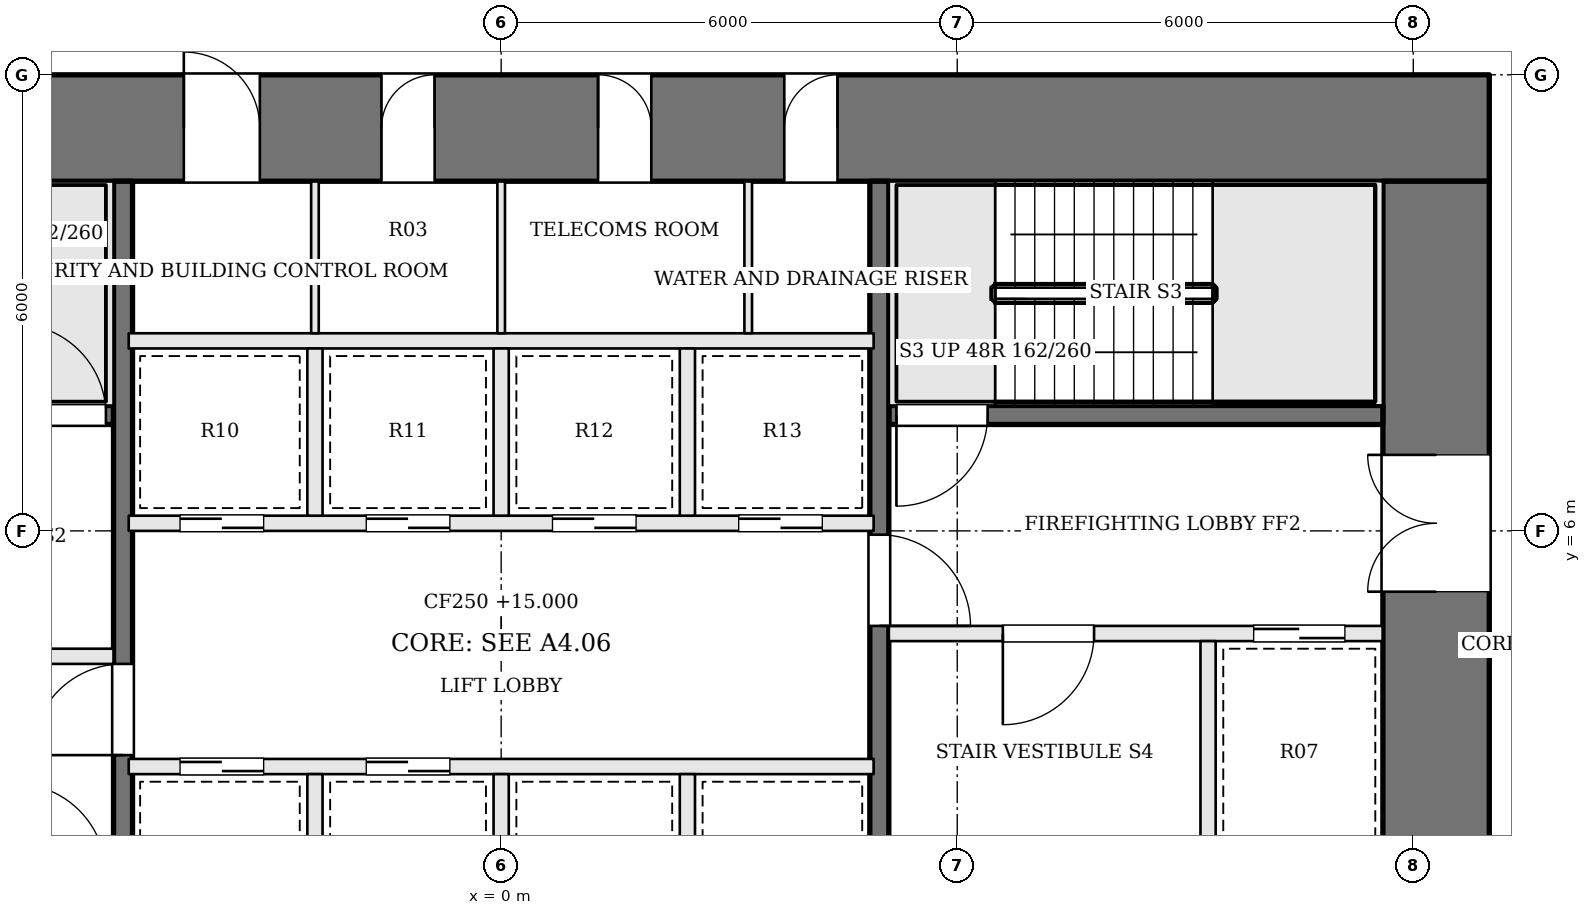
"""IFC4 building model, lengths in metres.
Left out: names, types, materials, properties, quantities, classifications, styles, units other than length and angle.
Written with IfcOpenShell. Run it as: python <this file> out.ifc"""

import sys

from ifc_helpers import new_model, si_unit, direction, frame, frame_2d, origin, place, context, subcontext, project, spatial, rectangle, extrude, element, fill, save


model = new_model("IFC4")
c1 = context("Model", 3, precision=1e-05, world=origin(), true_north=direction((0.0, 1.0)))
c2 = subcontext(c1, "Body", "Model", "MODEL_VIEW")
j1 = project(units=[si_unit("LENGTHUNIT", "METRE"), si_unit("PLANEANGLEUNIT", "RADIAN")], contexts=[c1])
p1 = place(None, origin())
s1 = spatial("IfcSite", under=j1, at=p1, CompositionType="ELEMENT")
p2 = place(p1, origin())
s2 = spatial("IfcBuilding", under=s1, at=p2, CompositionType="ELEMENT")
p3 = place(p2, frame((0.0, 0.0, 15.0)))
s3 = spatial("IfcBuildingStorey", under=s2, at=p3, CompositionType="ELEMENT", Elevation=15.0)
p4 = place(p3, frame((-13.0, 11.3, 0.0), z_axis=(0.0, 0.0, 1.0), x_axis=(1.0, 0.0, 0.0)))
e1 = element("IfcWall", 1, at=p4, inside=s3, PredefinedType="SHEAR", context=c2, shape_type="SweptSolid", body=[
    extrude(rectangle(XDim=26.0, YDim=1.4, at=frame_2d((13.0, 0.0))), origin(), (0.0, 0.0, 1.0), 7.8),
])
p5 = place(p4, frame((8.825, 0.0, 0.0)))
e2 = element("IfcOpeningElement", 2, at=p5, cuts=e1, PredefinedType="OPENING", context=c2, shape_type="SweptSolid", body=[
    extrude(rectangle(XDim=1.0, YDim=2.1, at=frame_2d((0.5, 1.05))), frame((0.0, 0.71, 0.0), z_axis=(0.0, -1.0, 0.0), x_axis=(1.0, 0.0, 0.0)), (0.0, 0.0, 1.0), 1.42),
])
p6 = place(p4, frame((11.425, 0.0, 0.0)))
e3 = element("IfcOpeningElement", 3, at=p6, cuts=e1, PredefinedType="OPENING", context=c2, shape_type="SweptSolid", body=[
    extrude(rectangle(XDim=0.7, YDim=2.1, at=frame_2d((0.35, 1.05))), frame((0.0, 0.71, 0.0), z_axis=(0.0, -1.0, 0.0), x_axis=(1.0, 0.0, 0.0)), (0.0, 0.0, 1.0), 1.42),
])
p7 = place(p4, frame((14.275, 0.0, 0.0)))
e4 = element("IfcOpeningElement", 4, at=p7, cuts=e1, PredefinedType="OPENING", context=c2, shape_type="SweptSolid", body=[
    extrude(rectangle(XDim=0.7, YDim=2.1, at=frame_2d((0.35, 1.05))), frame((0.0, 0.71, 0.0), z_axis=(0.0, -1.0, 0.0), x_axis=(1.0, 0.0, 0.0)), (0.0, 0.0, 1.0), 1.42),
])
p8 = place(p4, frame((16.725, 0.0, 0.0)))
e5 = element("IfcOpeningElement", 5, at=p8, cuts=e1, PredefinedType="OPENING", context=c2, shape_type="SweptSolid", body=[
    extrude(rectangle(XDim=0.7, YDim=2.1, at=frame_2d((0.35, 1.05))), frame((0.0, 0.71, 0.0), z_axis=(0.0, -1.0, 0.0), x_axis=(1.0, 0.0, 0.0)), (0.0, 0.0, 1.0), 1.42),
])
p9 = place(p3, frame((12.3, -1.6, 0.0), z_axis=(0.0, 0.0, 1.0), x_axis=(0.0, 1.0, 0.0)))
e6 = element("IfcWall", 6, at=p9, inside=s3, PredefinedType="SHEAR", context=c2, shape_type="SweptSolid", body=[
    extrude(rectangle(XDim=12.2, YDim=1.4, at=frame_2d((6.1, 0.0))), origin(), (0.0, 0.0, 1.0), 7.8),
])
p10 = place(p9, frame((6.8, 0.0, 0.0)))
e7 = element("IfcOpeningElement", 7, at=p10, cuts=e6, PredefinedType="OPENING", context=c2, shape_type="SweptSolid", body=[
    extrude(rectangle(XDim=1.8, YDim=2.1, at=frame_2d((0.9, 1.05))), frame((0.0, 0.71, 0.0), z_axis=(0.0, -1.0, 0.0), x_axis=(1.0, 0.0, 0.0)), (0.0, 0.0, 1.0), 1.42),
])
p11 = place(p3, frame((11.6, 7.525, 0.0), z_axis=(0.0, 0.0, 1.0), x_axis=(-1.0, 0.0, 0.0)))
e8 = element("IfcWall", 8, at=p11, inside=s3, PredefinedType="SOLIDWALL", context=c2, shape_type="SweptSolid", body=[
    extrude(rectangle(XDim=6.5, YDim=0.25, at=frame_2d((3.25, 0.0))), origin(), (0.0, 0.0, 1.0), 7.55),
])
p12 = place(p11, frame((5.2, 0.0, 0.0)))
e9 = element("IfcOpeningElement", 9, at=p12, cuts=e8, PredefinedType="OPENING", context=c2, shape_type="SweptSolid", body=[
    extrude(rectangle(XDim=1.2, YDim=2.1, at=frame_2d((0.6, 1.05))), frame((0.0, 0.135, 0.0), z_axis=(0.0, -1.0, 0.0), x_axis=(1.0, 0.0, 0.0)), (0.0, 0.0, 1.0), 0.27),
])
p13 = place(p3, frame((-11.6, 4.35, 0.0), z_axis=(0.0, 0.0, 1.0), x_axis=(1.0, 0.0, 0.0)))
e10 = element("IfcWall", 10, at=p13, inside=s3, PredefinedType="SOLIDWALL", context=c2, shape_type="SweptSolid", body=[
    extrude(rectangle(XDim=6.5, YDim=0.2, at=frame_2d((3.25, 0.0))), origin(), (0.0, 0.0, 1.0), 7.55),
])
p14 = place(p13, frame((3.8, 0.0, 0.0)))
e11 = element("IfcOpeningElement", 11, at=p14, cuts=e10, PredefinedType="OPENING", context=c2, shape_type="SweptSolid", body=[
    extrude(rectangle(XDim=1.2, YDim=2.1, at=frame_2d((0.6, 1.05))), frame((0.0, 0.11, 0.0), z_axis=(0.0, -1.0, 0.0), x_axis=(1.0, 0.0, 0.0)), (0.0, 0.0, 1.0), 0.22),
])
p15 = place(p13, frame((0.5, 0.0, 0.0)))
e12 = element("IfcOpeningElement", 12, at=p15, cuts=e10, PredefinedType="OPENING", context=c2, shape_type="SweptSolid", body=[
    extrude(rectangle(XDim=1.2, YDim=2.1, at=frame_2d((0.6, 1.05))), frame((0.0, 0.11, 0.0), z_axis=(0.0, -1.0, 0.0), x_axis=(1.0, 0.0, 0.0)), (0.0, 0.0, 1.0), 0.22),
])
p16 = place(p3, frame((11.6, 4.65, 0.0), z_axis=(0.0, 0.0, 1.0), x_axis=(-1.0, 0.0, 0.0)))
e13 = element("IfcWall", 13, at=p16, inside=s3, PredefinedType="SOLIDWALL", context=c2, shape_type="SweptSolid", body=[
    extrude(rectangle(XDim=6.5, YDim=0.2, at=frame_2d((3.25, 0.0))), origin(), (0.0, 0.0, 1.0), 7.55),
])
p17 = place(p16, frame((3.8, 0.0, 0.0)))
e14 = element("IfcOpeningElement", 14, at=p17, cuts=e13, PredefinedType="OPENING", context=c2, shape_type="SweptSolid", body=[
    extrude(rectangle(XDim=1.2, YDim=2.1, at=frame_2d((0.6, 1.05))), frame((0.0, 0.11, 0.0), z_axis=(0.0, -1.0, 0.0), x_axis=(1.0, 0.0, 0.0)), (0.0, 0.0, 1.0), 0.22),
])
p18 = place(p16, frame((0.5, 0.0, 0.0)))
e15 = element("IfcOpeningElement", 15, at=p18, cuts=e13, PredefinedType="OPENING", context=c2, shape_type="SweptSolid", body=[
    extrude(rectangle(XDim=1.2, YDim=2.1, at=frame_2d((0.6, 1.05))), frame((0.0, 0.11, 0.0), z_axis=(0.0, -1.0, 0.0), x_axis=(1.0, 0.0, 0.0)), (0.0, 0.0, 1.0), 0.22),
])
p19 = place(p3, frame((-11.6, 7.525, 0.0), z_axis=(0.0, 0.0, 1.0), x_axis=(1.0, 0.0, 0.0)))
e16 = element("IfcWall", 16, at=p19, inside=s3, PredefinedType="SOLIDWALL", context=c2, shape_type="SweptSolid", body=[
    extrude(rectangle(XDim=6.5, YDim=0.25, at=frame_2d((3.25, 0.0))), origin(), (0.0, 0.0, 1.0), 7.55),
])
p20 = place(p19, frame((5.2, 0.0, 0.0)))
e17 = element("IfcOpeningElement", 17, at=p20, cuts=e16, PredefinedType="OPENING", context=c2, shape_type="SweptSolid", body=[
    extrude(rectangle(XDim=1.2, YDim=2.1, at=frame_2d((0.6, 1.05))), frame((0.0, 0.135, 0.0), z_axis=(0.0, -1.0, 0.0), x_axis=(1.0, 0.0, 0.0)), (0.0, 0.0, 1.0), 0.27),
])
p21 = place(p3, frame((9.3, 4.55, 0.0), z_axis=(0.0, 0.0, 1.0), x_axis=(0.0, -1.0, 0.0)))
e18 = element("IfcWall", 18, at=p21, inside=s3, PredefinedType="SOLIDWALL", context=c2, shape_type="SweptSolid", body=[
    extrude(rectangle(XDim=3.0, YDim=0.2, at=frame_2d((1.5, 0.0))), origin(), (0.0, 0.0, 1.0), 7.55),
])
p22 = place(p3, frame((-4.975, -1.6, 0.0), z_axis=(0.0, 0.0, 1.0), x_axis=(0.0, 1.0, 0.0)))
e19 = element("IfcWall", 19, at=p22, inside=s3, PredefinedType="SOLIDWALL", context=c2, shape_type="SweptSolid", body=[
    extrude(rectangle(XDim=12.2, YDim=0.25, at=frame_2d((6.1, 0.0))), origin(), (0.0, 0.0, 1.0), 7.55),
])
p23 = place(p22, frame((4.65, 0.0, 0.0)))
e20 = element("IfcOpeningElement", 20, at=p23, cuts=e19, PredefinedType="OPENING", context=c2, shape_type="SweptSolid", body=[
    extrude(rectangle(XDim=1.2, YDim=2.1, at=frame_2d((0.6, 1.05))), frame((0.0, 0.135, 0.0), z_axis=(0.0, -1.0, 0.0), x_axis=(1.0, 0.0, 0.0)), (0.0, 0.0, 1.0), 0.27),
])
p24 = place(p3, frame((4.975, 10.6, 0.0), z_axis=(0.0, 0.0, 1.0), x_axis=(0.0, -1.0, 0.0)))
e21 = element("IfcWall", 21, at=p24, inside=s3, PredefinedType="SOLIDWALL", context=c2, shape_type="SweptSolid", body=[
    extrude(rectangle(XDim=12.2, YDim=0.25, at=frame_2d((6.1, 0.0))), origin(), (0.0, 0.0, 1.0), 7.55),
])
p25 = place(p24, frame((4.65, 0.0, 0.0)))
e22 = element("IfcOpeningElement", 22, at=p25, cuts=e21, PredefinedType="OPENING", context=c2, shape_type="SweptSolid", body=[
    extrude(rectangle(XDim=1.2, YDim=2.1, at=frame_2d((0.6, 1.05))), frame((0.0, 0.135, 0.0), z_axis=(0.0, -1.0, 0.0), x_axis=(1.0, 0.0, 0.0)), (0.0, 0.0, 1.0), 0.27),
])
p26 = place(p3, frame((-4.9, 2.9, 0.0), z_axis=(0.0, 0.0, 1.0), x_axis=(1.0, 0.0, 0.0)))
e23 = element("IfcWall", 23, at=p26, inside=s3, PredefinedType="SOLIDWALL", context=c2, shape_type="SweptSolid", body=[
    extrude(rectangle(XDim=9.8, YDim=0.2, at=frame_2d((4.9, 0.0))), origin(), (0.0, 0.0, 1.0), 7.55),
])
p27 = place(p26, frame((0.675, 0.0, 0.0)))
e24 = element("IfcOpeningElement", 24, at=p27, cuts=e23, PredefinedType="OPENING", context=c2, shape_type="SweptSolid", body=[
    extrude(rectangle(XDim=1.1, YDim=2.1, at=frame_2d((0.55, 1.05))), frame((0.0, 0.11, 0.0), z_axis=(0.0, -1.0, 0.0), x_axis=(1.0, 0.0, 0.0)), (0.0, 0.0, 1.0), 0.22),
])
p28 = place(p26, frame((3.125, 0.0, 0.0)))
e25 = element("IfcOpeningElement", 25, at=p28, cuts=e23, PredefinedType="OPENING", context=c2, shape_type="SweptSolid", body=[
    extrude(rectangle(XDim=1.1, YDim=2.1, at=frame_2d((0.55, 1.05))), frame((0.0, 0.11, 0.0), z_axis=(0.0, -1.0, 0.0), x_axis=(1.0, 0.0, 0.0)), (0.0, 0.0, 1.0), 0.22),
])
p29 = place(p3, frame((-4.9, 6.1, 0.0), z_axis=(0.0, 0.0, 1.0), x_axis=(1.0, 0.0, 0.0)))
e26 = element("IfcWall", 26, at=p29, inside=s3, PredefinedType="SOLIDWALL", context=c2, shape_type="SweptSolid", body=[
    extrude(rectangle(XDim=9.8, YDim=0.2, at=frame_2d((4.9, 0.0))), origin(), (0.0, 0.0, 1.0), 7.55),
])
p30 = place(p29, frame((0.675, 0.0, 0.0)))
e27 = element("IfcOpeningElement", 27, at=p30, cuts=e26, PredefinedType="OPENING", context=c2, shape_type="SweptSolid", body=[
    extrude(rectangle(XDim=1.1, YDim=2.1, at=frame_2d((0.55, 1.05))), frame((0.0, 0.11, 0.0), z_axis=(0.0, -1.0, 0.0), x_axis=(1.0, 0.0, 0.0)), (0.0, 0.0, 1.0), 0.22),
])
p31 = place(p29, frame((3.125, 0.0, 0.0)))
e28 = element("IfcOpeningElement", 28, at=p31, cuts=e26, PredefinedType="OPENING", context=c2, shape_type="SweptSolid", body=[
    extrude(rectangle(XDim=1.1, YDim=2.1, at=frame_2d((0.55, 1.05))), frame((0.0, 0.11, 0.0), z_axis=(0.0, -1.0, 0.0), x_axis=(1.0, 0.0, 0.0)), (0.0, 0.0, 1.0), 0.22),
])
p32 = place(p29, frame((5.575, 0.0, 0.0)))
e29 = element("IfcOpeningElement", 29, at=p32, cuts=e26, PredefinedType="OPENING", context=c2, shape_type="SweptSolid", body=[
    extrude(rectangle(XDim=1.1, YDim=2.1, at=frame_2d((0.55, 1.05))), frame((0.0, 0.11, 0.0), z_axis=(0.0, -1.0, 0.0), x_axis=(1.0, 0.0, 0.0)), (0.0, 0.0, 1.0), 0.22),
])
p33 = place(p29, frame((8.025, 0.0, 0.0)))
e30 = element("IfcOpeningElement", 30, at=p33, cuts=e26, PredefinedType="OPENING", context=c2, shape_type="SweptSolid", body=[
    extrude(rectangle(XDim=1.1, YDim=2.1, at=frame_2d((0.55, 1.05))), frame((0.0, 0.11, 0.0), z_axis=(0.0, -1.0, 0.0), x_axis=(1.0, 0.0, 0.0)), (0.0, 0.0, 1.0), 0.22),
])
p34 = place(p3, frame((-4.9, 8.5, 0.0), z_axis=(0.0, 0.0, 1.0), x_axis=(1.0, 0.0, 0.0)))
e31 = element("IfcWall", 31, at=p34, inside=s3, PredefinedType="SOLIDWALL", context=c2, shape_type="SweptSolid", body=[
    extrude(rectangle(XDim=9.8, YDim=0.2, at=frame_2d((4.9, 0.0))), origin(), (0.0, 0.0, 1.0), 7.55),
])
for number, where, z_axis, x_axis in (
    (32, (-2.45, 0.6, 0.0), (0.0, 0.0, 1.0), (0.0, 1.0, 0.0)),
    (33, (0.0, 0.6, 0.0), (0.0, 0.0, 1.0), (0.0, 1.0, 0.0)),
    (34, (2.45, 0.6, 0.0), (0.0, 0.0, 1.0), (0.0, 1.0, 0.0)),
    (35, (-2.45, 6.2, 0.0), (0.0, 0.0, 1.0), (0.0, 1.0, 0.0)),
    (36, (0.0, 6.2, 0.0), (0.0, 0.0, 1.0), (0.0, 1.0, 0.0)),
    (37, (2.45, 6.2, 0.0), (0.0, 0.0, 1.0), (0.0, 1.0, 0.0)),
):
    element("IfcWall", number, at=place(p3, frame(where, z_axis=z_axis, x_axis=x_axis)), inside=s3, PredefinedType="SOLIDWALL", context=c2, shape_type="SweptSolid", body=[
        extrude(rectangle(XDim=2.2, YDim=0.2, at=frame_2d((1.1, 0.0))), origin(), (0.0, 0.0, 1.0), 7.55),
    ])
for number, where, z_axis, x_axis in (
    (38, (-2.45, 8.6, 0.0), (0.0, 0.0, 1.0), (0.0, 1.0, 0.0)),
    (39, (0.0, 8.6, 0.0), (0.0, 0.0, 1.0), (0.0, 1.0, 0.0)),
    (40, (3.25, 8.6, 0.0), (0.0, 0.0, 1.0), (0.0, 1.0, 0.0)),
):
    element("IfcWall", number, at=place(p3, frame(where, z_axis=z_axis, x_axis=x_axis)), inside=s3, PredefinedType="PARTITIONING", context=c2, shape_type="SweptSolid", body=[
        extrude(rectangle(XDim=2.0, YDim=0.1, at=frame_2d((1.0, 0.0))), origin(), (0.0, 0.0, 1.0), 7.55),
    ])
p35 = place(p10, origin())
e41 = element("IfcDoor", 41, at=p35, inside=s3, OperationType="DOUBLE_DOOR_SINGLE_SWING", PredefinedType="DOOR", context=c2, shape_type="SweptSolid", body=[
    extrude(rectangle(XDim=1.8, YDim=2.1, at=frame_2d((0.9, 1.05))), frame((0.0, 0.025, 0.0), z_axis=(0.0, -1.0, 0.0), x_axis=(1.0, 0.0, 0.0)), (0.0, 0.0, 1.0), 0.05),
])
fill(e7, e41)
p36 = place(p23, origin())
e42 = element("IfcDoor", 42, at=p36, inside=s3, OperationType="SINGLE_SWING_LEFT", PredefinedType="DOOR", context=c2, shape_type="SweptSolid", body=[
    extrude(rectangle(XDim=1.2, YDim=2.1, at=frame_2d((0.6, 1.05))), frame((0.0, 0.025, 0.0), z_axis=(0.0, -1.0, 0.0), x_axis=(1.0, 0.0, 0.0)), (0.0, 0.0, 1.0), 0.05),
])
fill(e20, e42)
p37 = place(p25, origin())
e43 = element("IfcDoor", 43, at=p37, inside=s3, OperationType="SINGLE_SWING_RIGHT", PredefinedType="DOOR", context=c2, shape_type="SweptSolid", body=[
    extrude(rectangle(XDim=1.2, YDim=2.1, at=frame_2d((0.6, 1.05))), frame((0.0, 0.025, 0.0), z_axis=(0.0, -1.0, 0.0), x_axis=(1.0, 0.0, 0.0)), (0.0, 0.0, 1.0), 0.05),
])
fill(e22, e43)
p38 = place(p17, origin())
e44 = element("IfcDoor", 44, at=p38, inside=s3, OperationType="SINGLE_SWING_RIGHT", PredefinedType="DOOR", context=c2, shape_type="SweptSolid", body=[
    extrude(rectangle(XDim=1.2, YDim=2.1, at=frame_2d((0.6, 1.05))), frame((0.0, 0.025, 0.0), z_axis=(0.0, -1.0, 0.0), x_axis=(1.0, 0.0, 0.0)), (0.0, 0.0, 1.0), 0.05),
])
fill(e14, e44)
p39 = place(p12, origin())
e45 = element("IfcDoor", 45, at=p39, inside=s3, OperationType="SINGLE_SWING_RIGHT", PredefinedType="DOOR", context=c2, shape_type="SweptSolid", body=[
    extrude(rectangle(XDim=1.2, YDim=2.1, at=frame_2d((0.6, 1.05))), frame((0.0, 0.025, 0.0), z_axis=(0.0, -1.0, 0.0), x_axis=(1.0, 0.0, 0.0)), (0.0, 0.0, 1.0), 0.05),
])
fill(e9, e45)
p40 = place(p20, origin())
e46 = element("IfcDoor", 46, at=p40, inside=s3, OperationType="SINGLE_SWING_LEFT", PredefinedType="DOOR", context=c2, shape_type="SweptSolid", body=[
    extrude(rectangle(XDim=1.2, YDim=2.1, at=frame_2d((0.6, 1.05))), frame((0.0, 0.025, 0.0), z_axis=(0.0, -1.0, 0.0), x_axis=(1.0, 0.0, 0.0)), (0.0, 0.0, 1.0), 0.05),
])
fill(e17, e46)
p41 = place(p18, origin())
e47 = element("IfcDoor", 47, at=p41, inside=s3, OperationType="SLIDING_TO_RIGHT", PredefinedType="DOOR", context=c2, shape_type="SweptSolid", body=[
    extrude(rectangle(XDim=1.2, YDim=2.1, at=frame_2d((0.6, 1.05))), frame((0.0, 0.025, 0.0), z_axis=(0.0, -1.0, 0.0), x_axis=(1.0, 0.0, 0.0)), (0.0, 0.0, 1.0), 0.05),
])
fill(e15, e47)
p42 = place(p27, origin())
e48 = element("IfcDoor", 48, at=p42, inside=s3, OperationType="SLIDING_TO_RIGHT", PredefinedType="DOOR", context=c2, shape_type="SweptSolid", body=[
    extrude(rectangle(XDim=1.1, YDim=2.1, at=frame_2d((0.55, 1.05))), frame((0.0, 0.025, 0.0), z_axis=(0.0, -1.0, 0.0), x_axis=(1.0, 0.0, 0.0)), (0.0, 0.0, 1.0), 0.05),
])
fill(e24, e48)
p43 = place(p28, origin())
e49 = element("IfcDoor", 49, at=p43, inside=s3, OperationType="SLIDING_TO_LEFT", PredefinedType="DOOR", context=c2, shape_type="SweptSolid", body=[
    extrude(rectangle(XDim=1.1, YDim=2.1, at=frame_2d((0.55, 1.05))), frame((0.0, 0.025, 0.0), z_axis=(0.0, -1.0, 0.0), x_axis=(1.0, 0.0, 0.0)), (0.0, 0.0, 1.0), 0.05),
])
fill(e25, e49)
p44 = place(p30, origin())
e50 = element("IfcDoor", 50, at=p44, inside=s3, OperationType="SLIDING_TO_RIGHT", PredefinedType="DOOR", context=c2, shape_type="SweptSolid", body=[
    extrude(rectangle(XDim=1.1, YDim=2.1, at=frame_2d((0.55, 1.05))), frame((0.0, 0.025, 0.0), z_axis=(0.0, -1.0, 0.0), x_axis=(1.0, 0.0, 0.0)), (0.0, 0.0, 1.0), 0.05),
])
fill(e27, e50)
p45 = place(p31, origin())
e51 = element("IfcDoor", 51, at=p45, inside=s3, OperationType="SLIDING_TO_LEFT", PredefinedType="DOOR", context=c2, shape_type="SweptSolid", body=[
    extrude(rectangle(XDim=1.1, YDim=2.1, at=frame_2d((0.55, 1.05))), frame((0.0, 0.025, 0.0), z_axis=(0.0, -1.0, 0.0), x_axis=(1.0, 0.0, 0.0)), (0.0, 0.0, 1.0), 0.05),
])
fill(e28, e51)
p46 = place(p32, origin())
e52 = element("IfcDoor", 52, at=p46, inside=s3, OperationType="SLIDING_TO_RIGHT", PredefinedType="DOOR", context=c2, shape_type="SweptSolid", body=[
    extrude(rectangle(XDim=1.1, YDim=2.1, at=frame_2d((0.55, 1.05))), frame((0.0, 0.025, 0.0), z_axis=(0.0, -1.0, 0.0), x_axis=(1.0, 0.0, 0.0)), (0.0, 0.0, 1.0), 0.05),
])
fill(e29, e52)
p47 = place(p33, origin())
e53 = element("IfcDoor", 53, at=p47, inside=s3, OperationType="SLIDING_TO_LEFT", PredefinedType="DOOR", context=c2, shape_type="SweptSolid", body=[
    extrude(rectangle(XDim=1.1, YDim=2.1, at=frame_2d((0.55, 1.05))), frame((0.0, 0.025, 0.0), z_axis=(0.0, -1.0, 0.0), x_axis=(1.0, 0.0, 0.0)), (0.0, 0.0, 1.0), 0.05),
])
fill(e30, e53)
p48 = place(p5, origin())
e54 = element("IfcDoor", 54, at=p48, inside=s3, OperationType="SINGLE_SWING_LEFT", PredefinedType="DOOR", context=c2, shape_type="SweptSolid", body=[
    extrude(rectangle(XDim=1.0, YDim=2.1, at=frame_2d((0.5, 1.05))), frame((0.0, 0.025, 0.0), z_axis=(0.0, -1.0, 0.0), x_axis=(1.0, 0.0, 0.0)), (0.0, 0.0, 1.0), 0.05),
])
fill(e2, e54)
p49 = place(p6, origin())
e55 = element("IfcDoor", 55, at=p49, inside=s3, OperationType="SINGLE_SWING_RIGHT", PredefinedType="DOOR", context=c2, shape_type="SweptSolid", body=[
    extrude(rectangle(XDim=0.7, YDim=2.1, at=frame_2d((0.35, 1.05))), frame((0.0, 0.025, 0.0), z_axis=(0.0, -1.0, 0.0), x_axis=(1.0, 0.0, 0.0)), (0.0, 0.0, 1.0), 0.05),
])
fill(e3, e55)
p50 = place(p7, origin())
e56 = element("IfcDoor", 56, at=p50, inside=s3, OperationType="SINGLE_SWING_LEFT", PredefinedType="DOOR", context=c2, shape_type="SweptSolid", body=[
    extrude(rectangle(XDim=0.7, YDim=2.1, at=frame_2d((0.35, 1.05))), frame((0.0, 0.025, 0.0), z_axis=(0.0, -1.0, 0.0), x_axis=(1.0, 0.0, 0.0)), (0.0, 0.0, 1.0), 0.05),
])
fill(e4, e56)
p51 = place(p8, origin())
e57 = element("IfcDoor", 57, at=p51, inside=s3, OperationType="SINGLE_SWING_RIGHT", PredefinedType="DOOR", context=c2, shape_type="SweptSolid", body=[
    extrude(rectangle(XDim=0.7, YDim=2.1, at=frame_2d((0.35, 1.05))), frame((0.0, 0.025, 0.0), z_axis=(0.0, -1.0, 0.0), x_axis=(1.0, 0.0, 0.0)), (0.0, 0.0, 1.0), 0.05),
])
fill(e5, e57)
save(model, sys.argv[1])
